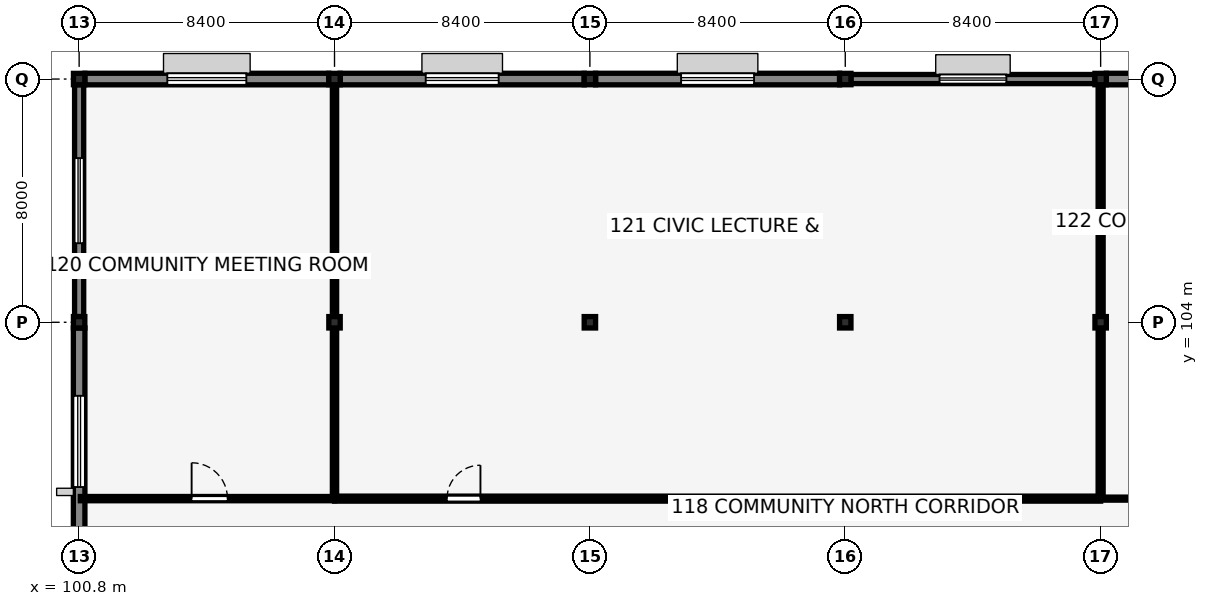
"""IFC4 building model, lengths in metres.
Left out: names, types, materials, properties, quantities, classifications, styles, units other than length and angle.
Written with IfcOpenShell. Run it as: python <this file> out.ifc"""

import sys

from ifc_helpers import new_model, si_unit, direction, frame, frame_2d, origin, origin_2d, place, context, subcontext, project, spatial, rectangle, i_section, extrude, element, fill, save


model = new_model("IFC4")
c1 = context("Model", 3, precision=1e-05, world=origin(), true_north=direction((0.0, 1.0)))
c2 = subcontext(c1, "Body", "Model", "MODEL_VIEW")
j1 = project(units=[si_unit("LENGTHUNIT", "METRE"), si_unit("PLANEANGLEUNIT", "RADIAN")], contexts=[c1])
p1 = place(None, origin())
s1 = spatial("IfcSite", under=j1, at=p1, CompositionType="ELEMENT")
p2 = place(p1, origin())
s2 = spatial("IfcBuilding", under=s1, at=p2, CompositionType="ELEMENT")
p3 = place(p2, frame((0.0, 0.0, 5.44)))
s3 = spatial("IfcBuildingStorey", under=s2, at=p3, CompositionType="ELEMENT", Elevation=5.44)
for number, where, z_axis, x_axis in (
    (1, (100.8, 104.0, 0.0), (0.0, 0.0, 1.0), (1.0, 0.0, 0.0)),
    (2, (100.8, 112.0, 0.0), (0.0, 0.0, 1.0), (1.0, 0.0, 0.0)),
    (3, (109.2, 104.0, 0.0), (0.0, 0.0, 1.0), (1.0, 0.0, 0.0)),
    (4, (109.2, 112.0, 0.0), (0.0, 0.0, 1.0), (1.0, 0.0, 0.0)),
    (5, (117.6, 104.0, 0.0), (0.0, 0.0, 1.0), (1.0, 0.0, 0.0)),
    (6, (117.6, 112.0, 0.0), (0.0, 0.0, 1.0), (1.0, 0.0, 0.0)),
    (7, (126.0, 104.0, 0.0), (0.0, 0.0, 1.0), (1.0, 0.0, 0.0)),
    (8, (126.0, 112.0, 0.0), (0.0, 0.0, 1.0), (1.0, 0.0, 0.0)),
    (9, (134.4, 104.0, 0.0), (0.0, 0.0, 1.0), (1.0, 0.0, 0.0)),
    (10, (134.4, 112.0, 0.0), (0.0, 0.0, 1.0), (1.0, 0.0, 0.0)),
):
    element("IfcColumn", number, at=place(p3, frame(where, z_axis=z_axis, x_axis=x_axis)), inside=s3, PredefinedType="COLUMN", context=c2, shape_type="SweptSolid", body=[
        extrude(i_section(OverallWidth=0.375, OverallDepth=0.375, WebThickness=0.017, FlangeThickness=0.027, FilletRadius=0.015, at=origin_2d()), origin(), (0.0, 0.0, 1.0), 3.8),
    ])
p4 = place(p3, frame((100.8, 96.35, 0.0), z_axis=(0.0, 0.0, 1.0), x_axis=(0.0, 1.0, 0.0)))
e11 = element("IfcWall", 11, at=p4, inside=s3, PredefinedType="SOLIDWALL", context=c2, shape_type="SweptSolid", body=[
    extrude(rectangle(XDim=7.463, YDim=0.38, at=frame_2d((3.731, 0.0))), origin(), (0.0, 0.0, 1.0), 3.442),
])
p5 = place(p4, frame((2.231, 0.0, 0.9), z_axis=(0.0, 0.0, 1.0), x_axis=(1.0, 0.0, 0.0)))
e12 = element("IfcOpeningElement", 12, at=p5, cuts=e11, PredefinedType="OPENING", context=c2, shape_type="SweptSolid", body=[
    extrude(rectangle(XDim=3.0, YDim=1.65, at=frame_2d((1.5, 0.825))), frame((0.0, 0.2, 0.0), z_axis=(0.0, -1.0, 0.0), x_axis=(1.0, 0.0, 0.0)), (0.0, 0.0, 1.0), 0.4),
])
p6 = place(p3, frame((100.8, 104.187, 0.0), z_axis=(0.0, 0.0, 1.0), x_axis=(0.0, 1.0, 0.0)))
e13 = element("IfcWall", 13, at=p6, inside=s3, PredefinedType="SOLIDWALL", context=c2, shape_type="SweptSolid", body=[
    extrude(rectangle(XDim=7.625, YDim=0.3, at=frame_2d((3.813, 0.0))), origin(), (0.0, 0.0, 1.0), 3.442),
])
p7 = place(p6, frame((2.413, 0.0, 0.9), z_axis=(0.0, 0.0, 1.0), x_axis=(1.0, 0.0, 0.0)))
e14 = element("IfcOpeningElement", 14, at=p7, cuts=e13, PredefinedType="OPENING", context=c2, shape_type="SweptSolid", body=[
    extrude(rectangle(XDim=2.8, YDim=1.6, at=frame_2d((1.4, 0.8))), frame((0.0, 0.16, 0.0), z_axis=(0.0, -1.0, 0.0), x_axis=(1.0, 0.0, 0.0)), (0.0, 0.0, 1.0), 0.32),
])
p8 = place(p3, frame((100.987, 112.0, 0.0), z_axis=(0.0, 0.0, 1.0), x_axis=(1.0, 0.0, 0.0)))
e15 = element("IfcWall", 15, at=p8, inside=s3, PredefinedType="SOLIDWALL", context=c2, shape_type="SweptSolid", body=[
    extrude(rectangle(XDim=8.025, YDim=0.38, at=frame_2d((4.013, 0.0))), origin(), (0.0, 0.0, 1.0), 3.45),
])
p9 = place(p8, frame((2.713, 0.0, 0.9), z_axis=(0.0, 0.0, 1.0), x_axis=(1.0, 0.0, 0.0)))
e16 = element("IfcOpeningElement", 16, at=p9, cuts=e15, PredefinedType="OPENING", context=c2, shape_type="SweptSolid", body=[
    extrude(rectangle(XDim=2.6, YDim=1.8, at=frame_2d((1.3, 0.9))), frame((0.0, 0.2, 0.0), z_axis=(0.0, -1.0, 0.0), x_axis=(1.0, 0.0, 0.0)), (0.0, 0.0, 1.0), 0.4),
])
p10 = place(p3, frame((109.387, 112.0, 0.0), z_axis=(0.0, 0.0, 1.0), x_axis=(1.0, 0.0, 0.0)))
e17 = element("IfcWall", 17, at=p10, inside=s3, PredefinedType="SOLIDWALL", context=c2, shape_type="SweptSolid", body=[
    extrude(rectangle(XDim=8.025, YDim=0.38, at=frame_2d((4.013, 0.0))), origin(), (0.0, 0.0, 1.0), 3.45),
])
p11 = place(p10, frame((2.813, 0.0, 0.9), z_axis=(0.0, 0.0, 1.0), x_axis=(1.0, 0.0, 0.0)))
e18 = element("IfcOpeningElement", 18, at=p11, cuts=e17, PredefinedType="OPENING", context=c2, shape_type="SweptSolid", body=[
    extrude(rectangle(XDim=2.4, YDim=1.75, at=frame_2d((1.2, 0.875))), frame((0.0, 0.2, 0.0), z_axis=(0.0, -1.0, 0.0), x_axis=(1.0, 0.0, 0.0)), (0.0, 0.0, 1.0), 0.4),
])
p12 = place(p3, frame((117.787, 112.0, 0.0), z_axis=(0.0, 0.0, 1.0), x_axis=(1.0, 0.0, 0.0)))
e19 = element("IfcWall", 19, at=p12, inside=s3, PredefinedType="SOLIDWALL", context=c2, shape_type="SweptSolid", body=[
    extrude(rectangle(XDim=8.025, YDim=0.38, at=frame_2d((4.013, 0.0))), origin(), (0.0, 0.0, 1.0), 3.45),
])
p13 = place(p12, frame((2.813, 0.0, 0.9), z_axis=(0.0, 0.0, 1.0), x_axis=(1.0, 0.0, 0.0)))
e20 = element("IfcOpeningElement", 20, at=p13, cuts=e19, PredefinedType="OPENING", context=c2, shape_type="SweptSolid", body=[
    extrude(rectangle(XDim=2.4, YDim=1.5, at=frame_2d((1.2, 0.75))), frame((0.0, 0.2, 0.0), z_axis=(0.0, -1.0, 0.0), x_axis=(1.0, 0.0, 0.0)), (0.0, 0.0, 1.0), 0.4),
])
p14 = place(p3, frame((126.187, 112.0, 0.0), z_axis=(0.0, 0.0, 1.0), x_axis=(1.0, 0.0, 0.0)))
e21 = element("IfcWall", 21, at=p14, inside=s3, PredefinedType="SOLIDWALL", context=c2, shape_type="SweptSolid", body=[
    extrude(rectangle(XDim=8.025, YDim=0.3, at=frame_2d((4.013, 0.0))), origin(), (0.0, 0.0, 1.0), 3.45),
])
p15 = place(p14, frame((2.913, 0.0, 0.9), z_axis=(0.0, 0.0, 1.0), x_axis=(1.0, 0.0, 0.0)))
e22 = element("IfcOpeningElement", 22, at=p15, cuts=e21, PredefinedType="OPENING", context=c2, shape_type="SweptSolid", body=[
    extrude(rectangle(XDim=2.2, YDim=1.5, at=frame_2d((1.1, 0.75))), frame((0.0, 0.16, 0.0), z_axis=(0.0, -1.0, 0.0), x_axis=(1.0, 0.0, 0.0)), (0.0, 0.0, 1.0), 0.32),
])
p16 = place(p3, frame((134.587, 112.0, 0.0), z_axis=(0.0, 0.0, 1.0), x_axis=(1.0, 0.0, 0.0)))
e23 = element("IfcWall", 23, at=p16, inside=s3, PredefinedType="SOLIDWALL", context=c2, shape_type="SweptSolid", body=[
    extrude(rectangle(XDim=8.025, YDim=0.38, at=frame_2d((4.013, 0.0))), origin(), (0.0, 0.0, 1.0), 3.45),
])
p17 = place(p16, frame((3.013, 0.0, 0.9), z_axis=(0.0, 0.0, 1.0), x_axis=(1.0, 0.0, 0.0)))
e24 = element("IfcOpeningElement", 24, at=p17, cuts=e23, PredefinedType="OPENING", context=c2, shape_type="SweptSolid", body=[
    extrude(rectangle(XDim=2.0, YDim=1.5, at=frame_2d((1.0, 0.75))), frame((0.0, 0.2, 0.0), z_axis=(0.0, -1.0, 0.0), x_axis=(1.0, 0.0, 0.0)), (0.0, 0.0, 1.0), 0.4),
])
p18 = place(p3, frame((100.84, 98.2, 0.0), z_axis=(0.0, 0.0, 1.0), x_axis=(1.0, 0.0, 0.0)))
e25 = element("IfcWall", 25, at=p18, inside=s3, PredefinedType="PARTITIONING", context=c2, shape_type="SweptSolid", body=[
    extrude(rectangle(XDim=8.36, YDim=0.14, at=frame_2d((4.18, 0.0))), origin(), (0.0, 0.0, 1.0), 3.8),
])
p19 = place(p18, frame((3.66, 0.0, 0.0), z_axis=(0.0, 0.0, 1.0), x_axis=(1.0, 0.0, 0.0)))
e26 = element("IfcOpeningElement", 26, at=p19, cuts=e25, PredefinedType="OPENING", context=c2, shape_type="SweptSolid", body=[
    extrude(rectangle(XDim=1.18, YDim=2.22, at=frame_2d((0.59, 1.11))), frame((0.0, 0.08, 0.0), z_axis=(0.0, -1.0, 0.0), x_axis=(1.0, 0.0, 0.0)), (0.0, 0.0, 1.0), 0.16),
])
p20 = place(p3, frame((109.2, 98.2, 0.0), z_axis=(0.0, 0.0, 1.0), x_axis=(1.0, 0.0, 0.0)))
e27 = element("IfcWall", 27, at=p20, inside=s3, PredefinedType="PARTITIONING", context=c2, shape_type="SweptSolid", body=[
    extrude(rectangle(XDim=25.2, YDim=0.165, at=frame_2d((12.6, 0.0))), origin(), (0.0, 0.0, 1.0), 3.8),
])
p21 = place(p20, frame((3.7, 0.0, 0.0), z_axis=(0.0, 0.0, 1.0), x_axis=(1.0, 0.0, 0.0)))
e28 = element("IfcOpeningElement", 28, at=p21, cuts=e27, PredefinedType="OPENING", context=c2, shape_type="SweptSolid", body=[
    extrude(rectangle(XDim=1.1, YDim=2.2, at=frame_2d((0.55, 1.1))), frame((0.0, 0.093, 0.0), z_axis=(0.0, -1.0, 0.0), x_axis=(1.0, 0.0, 0.0)), (0.0, 0.0, 1.0), 0.185),
])
p22 = place(p3, frame((134.4, 98.2, 0.0), z_axis=(0.0, 0.0, 1.0), x_axis=(1.0, 0.0, 0.0)))
e29 = element("IfcWall", 29, at=p22, inside=s3, PredefinedType="PARTITIONING", context=c2, shape_type="SweptSolid", body=[
    extrude(rectangle(XDim=16.8, YDim=0.1, at=frame_2d((8.4, 0.0))), origin(), (0.0, 0.0, 1.0), 3.337),
])
p23 = place(p22, frame((3.7, 0.0, 0.0), z_axis=(0.0, 0.0, 1.0), x_axis=(1.0, 0.0, 0.0)))
e30 = element("IfcOpeningElement", 30, at=p23, cuts=e29, PredefinedType="OPENING", context=c2, shape_type="SweptSolid", body=[
    extrude(rectangle(XDim=0.9, YDim=2.1, at=frame_2d((0.45, 1.05))), frame((0.0, 0.06, 0.0), z_axis=(0.0, -1.0, 0.0), x_axis=(1.0, 0.0, 0.0)), (0.0, 0.0, 1.0), 0.12),
])
p24 = place(p3, frame((109.2, 98.2, 0.0), z_axis=(0.0, 0.0, 1.0), x_axis=(0.0, 1.0, 0.0)))
e31 = element("IfcWall", 31, at=p24, inside=s3, PredefinedType="PARTITIONING", context=c2, shape_type="SweptSolid", body=[
    extrude(rectangle(XDim=5.623, YDim=0.14, at=frame_2d((2.812, 0.0))), origin(), (0.0, 0.0, 1.0), 3.337),
])
p25 = place(p3, frame((109.2, 104.177, 0.0), z_axis=(0.0, 0.0, 1.0), x_axis=(0.0, 1.0, 0.0)))
e32 = element("IfcWall", 32, at=p25, inside=s3, PredefinedType="PARTITIONING", context=c2, shape_type="SweptSolid", body=[
    extrude(rectangle(XDim=7.646, YDim=0.14, at=frame_2d((3.823, 0.0))), origin(), (0.0, 0.0, 1.0), 3.337),
])
p26 = place(p3, frame((134.4, 98.2, 0.0), z_axis=(0.0, 0.0, 1.0), x_axis=(0.0, 1.0, 0.0)))
e33 = element("IfcWall", 33, at=p26, inside=s3, PredefinedType="PARTITIONING", context=c2, shape_type="SweptSolid", body=[
    extrude(rectangle(XDim=5.623, YDim=0.165, at=frame_2d((2.812, 0.0))), origin(), (0.0, 0.0, 1.0), 3.337),
])
p27 = place(p3, frame((134.4, 104.177, 0.0), z_axis=(0.0, 0.0, 1.0), x_axis=(0.0, 1.0, 0.0)))
e34 = element("IfcWall", 34, at=p27, inside=s3, PredefinedType="PARTITIONING", context=c2, shape_type="SweptSolid", body=[
    extrude(rectangle(XDim=7.646, YDim=0.165, at=frame_2d((3.823, 0.0))), origin(), (0.0, 0.0, 1.0), 3.337),
])
p28 = place(p5, origin())
e35 = element("IfcWindow", 35, at=p28, inside=s3, PartitioningType="DOUBLE_PANEL_VERTICAL", PredefinedType="WINDOW", context=c2, shape_type="SweptSolid", body=[
    extrude(rectangle(XDim=3.0, YDim=1.65, at=frame_2d((1.5, 0.825))), frame((0.0, 0.03, 0.0), z_axis=(0.0, -1.0, 0.0), x_axis=(1.0, 0.0, 0.0)), (0.0, 0.0, 1.0), 0.06),
])
fill(e12, e35)
p29 = place(p7, origin())
e36 = element("IfcWindow", 36, at=p29, inside=s3, PartitioningType="DOUBLE_PANEL_VERTICAL", PredefinedType="WINDOW", context=c2, shape_type="SweptSolid", body=[
    extrude(rectangle(XDim=2.8, YDim=1.6, at=frame_2d((1.4, 0.8))), frame((0.0, 0.03, 0.0), z_axis=(0.0, -1.0, 0.0), x_axis=(1.0, 0.0, 0.0)), (0.0, 0.0, 1.0), 0.06),
])
fill(e14, e36)
p30 = place(p9, origin())
e37 = element("IfcWindow", 37, at=p30, inside=s3, PartitioningType="DOUBLE_PANEL_VERTICAL", PredefinedType="WINDOW", context=c2, shape_type="SweptSolid", body=[
    extrude(rectangle(XDim=2.6, YDim=1.8, at=frame_2d((1.3, 0.9))), frame((0.0, 0.03, 0.0), z_axis=(0.0, -1.0, 0.0), x_axis=(1.0, 0.0, 0.0)), (0.0, 0.0, 1.0), 0.06),
])
fill(e16, e37)
p31 = place(p11, origin())
e38 = element("IfcWindow", 38, at=p31, inside=s3, PartitioningType="DOUBLE_PANEL_VERTICAL", PredefinedType="WINDOW", context=c2, shape_type="SweptSolid", body=[
    extrude(rectangle(XDim=2.4, YDim=1.75, at=frame_2d((1.2, 0.875))), frame((0.0, 0.03, 0.0), z_axis=(0.0, -1.0, 0.0), x_axis=(1.0, 0.0, 0.0)), (0.0, 0.0, 1.0), 0.06),
])
fill(e18, e38)
p32 = place(p13, origin())
e39 = element("IfcWindow", 39, at=p32, inside=s3, PartitioningType="DOUBLE_PANEL_VERTICAL", PredefinedType="WINDOW", context=c2, shape_type="SweptSolid", body=[
    extrude(rectangle(XDim=2.4, YDim=1.5, at=frame_2d((1.2, 0.75))), frame((0.0, 0.03, 0.0), z_axis=(0.0, -1.0, 0.0), x_axis=(1.0, 0.0, 0.0)), (0.0, 0.0, 1.0), 0.06),
])
fill(e20, e39)
p33 = place(p15, origin())
e40 = element("IfcWindow", 40, at=p33, inside=s3, PartitioningType="DOUBLE_PANEL_VERTICAL", PredefinedType="WINDOW", context=c2, shape_type="SweptSolid", body=[
    extrude(rectangle(XDim=2.2, YDim=1.5, at=frame_2d((1.1, 0.75))), frame((0.0, 0.03, 0.0), z_axis=(0.0, -1.0, 0.0), x_axis=(1.0, 0.0, 0.0)), (0.0, 0.0, 1.0), 0.06),
])
fill(e22, e40)
p34 = place(p19, origin())
e41 = element("IfcDoor", 41, at=p34, inside=s3, OperationType="SINGLE_SWING_LEFT", PredefinedType="DOOR", context=c2, shape_type="SweptSolid", body=[
    extrude(rectangle(XDim=1.18, YDim=2.22, at=frame_2d((0.59, 1.11))), frame((0.0, 0.025, 0.0), z_axis=(0.0, -1.0, 0.0), x_axis=(1.0, 0.0, 0.0)), (0.0, 0.0, 1.0), 0.05),
])
fill(e26, e41)
p35 = place(p21, origin())
e42 = element("IfcDoor", 42, at=p35, inside=s3, OperationType="SINGLE_SWING_RIGHT", PredefinedType="DOOR", context=c2, shape_type="SweptSolid", body=[
    extrude(rectangle(XDim=1.1, YDim=2.2, at=frame_2d((0.55, 1.1))), frame((0.0, 0.025, 0.0), z_axis=(0.0, -1.0, 0.0), x_axis=(1.0, 0.0, 0.0)), (0.0, 0.0, 1.0), 0.05),
])
fill(e28, e42)
save(model, sys.argv[1])
